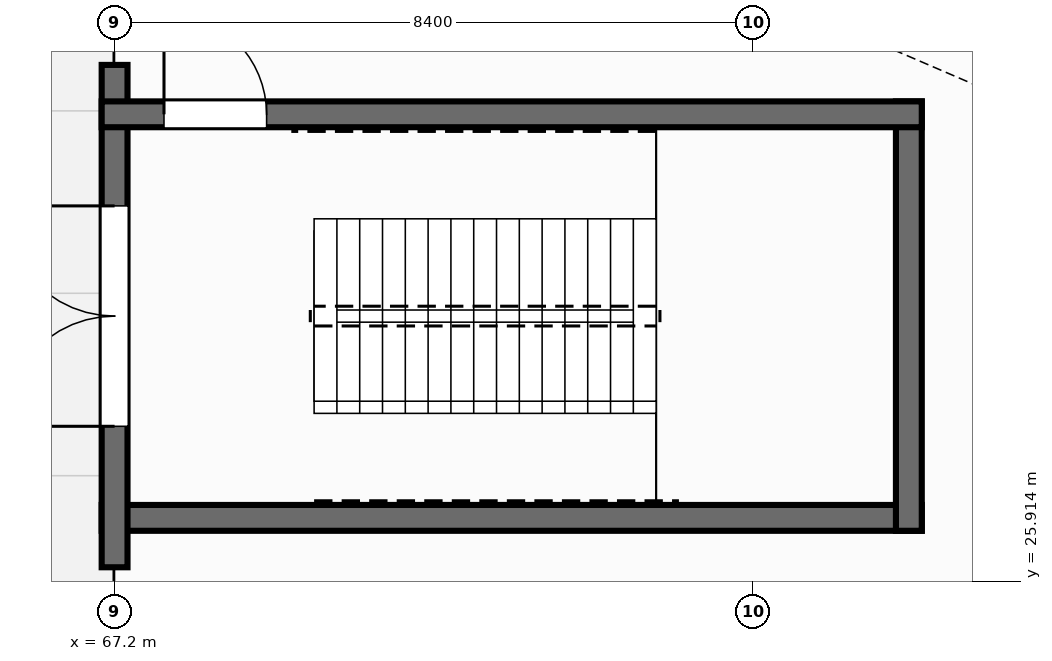
"""IFC4 building model, lengths in metres.
Left out: names, types, materials, properties, quantities, classifications, styles, units other than length and angle.
Written with IfcOpenShell. Run it as: python <this file> out.ifc"""

import sys

from ifc_helpers import new_model, si_unit, direction, frame, frame_2d, origin, place, context, subcontext, project, spatial, rectangle, extrude, element, fill, save


model = new_model("IFC4")
c1 = context("Model", 3, precision=1e-05, world=origin(), true_north=direction((0.0, 1.0)))
c2 = subcontext(c1, "Body", "Model", "MODEL_VIEW")
j1 = project(units=[si_unit("LENGTHUNIT", "METRE"), si_unit("PLANEANGLEUNIT", "RADIAN")], contexts=[c1])
p1 = place(None, origin())
s1 = spatial("IfcSite", under=j1, at=p1, CompositionType="ELEMENT")
p2 = place(p1, origin())
s2 = spatial("IfcBuilding", under=s1, at=p2, CompositionType="ELEMENT")
p3 = place(p2, origin())
s3 = spatial("IfcBuildingStorey", under=s2, at=p3, CompositionType="ELEMENT", Elevation=0.0)
p4 = place(p3, frame((67.035, 26.745, 0.0), z_axis=(0.0, 0.0, 1.0), x_axis=(1.0, 0.0, 0.0)))
e1 = element("IfcWall", 1, at=p4, inside=s3, PredefinedType="SHEAR", context=c2, shape_type="SweptSolid", body=[
    extrude(rectangle(XDim=10.79, YDim=0.34, at=frame_2d((5.395, 0.0))), origin(), (0.0, 0.0, 1.0), 5.175),
])
p5 = place(p3, frame((67.205, 26.095, 0.0), z_axis=(0.0, 0.0, 1.0), x_axis=(0.0, 1.0, 0.0)))
e2 = element("IfcWall", 2, at=p5, inside=s3, PredefinedType="SHEAR", context=c2, shape_type="SweptSolid", body=[
    extrude(rectangle(XDim=6.61, YDim=0.34, at=frame_2d((3.305, 0.0))), origin(), (0.0, 0.0, 1.0), 5.175),
])
p6 = place(p5, frame((1.855, 0.0, 0.0)))
e3 = element("IfcOpeningElement", 3, at=p6, cuts=e2, PredefinedType="OPENING", context=c2, shape_type="SweptSolid", body=[
    extrude(rectangle(XDim=2.9, YDim=2.38, at=frame_2d((1.45, 1.19))), frame((0.0, 0.18, 0.0), z_axis=(0.0, -1.0, 0.0), x_axis=(1.0, 0.0, 0.0)), (0.0, 0.0, 1.0), 0.36),
])
p7 = place(p3, frame((77.655, 26.575, 0.0), z_axis=(0.0, 0.0, 1.0), x_axis=(0.0, 1.0, 0.0)))
e4 = element("IfcWall", 4, at=p7, inside=s3, PredefinedType="SHEAR", context=c2, shape_type="SweptSolid", body=[
    extrude(rectangle(XDim=5.65, YDim=0.34, at=frame_2d((2.825, 0.0))), origin(), (0.0, 0.0, 1.0), 5.175),
])
p8 = place(p3, frame((67.035, 32.055, 0.0), z_axis=(0.0, 0.0, 1.0), x_axis=(1.0, 0.0, 0.0)))
e5 = element("IfcWall", 5, at=p8, inside=s3, PredefinedType="SHEAR", context=c2, shape_type="SweptSolid", body=[
    extrude(rectangle(XDim=10.79, YDim=0.34, at=frame_2d((5.395, 0.0))), origin(), (0.0, 0.0, 1.0), 5.175),
])
p9 = place(p8, frame((0.82, 0.0, 0.0)))
e6 = element("IfcOpeningElement", 6, at=p9, cuts=e5, PredefinedType="OPENING", context=c2, shape_type="SweptSolid", body=[
    extrude(rectangle(XDim=1.35, YDim=2.2, at=frame_2d((0.675, 1.1))), frame((0.0, 0.18, 0.0), z_axis=(0.0, -1.0, 0.0), x_axis=(1.0, 0.0, 0.0)), (0.0, 0.0, 1.0), 0.36),
])
p10 = place(p6, origin())
e7 = element("IfcDoor", 7, at=p10, inside=s3, OperationType="DOUBLE_DOOR_SINGLE_SWING", PredefinedType="DOOR", context=c2, shape_type="SweptSolid", body=[
    extrude(rectangle(XDim=2.9, YDim=2.38, at=frame_2d((1.45, 1.19))), frame((0.0, 0.025, 0.0), z_axis=(0.0, -1.0, 0.0), x_axis=(1.0, 0.0, 0.0)), (0.0, 0.0, 1.0), 0.05),
])
fill(e3, e7)
p11 = place(p9, origin())
e8 = element("IfcDoor", 8, at=p11, inside=s3, OperationType="SINGLE_SWING_LEFT", PredefinedType="DOOR", context=c2, shape_type="SweptSolid", body=[
    extrude(rectangle(XDim=1.35, YDim=2.2, at=frame_2d((0.675, 1.1))), frame((0.0, 0.025, 0.0), z_axis=(0.0, -1.0, 0.0), x_axis=(1.0, 0.0, 0.0)), (0.0, 0.0, 1.0), 0.05),
])
fill(e6, e8)
save(model, sys.argv[1])
